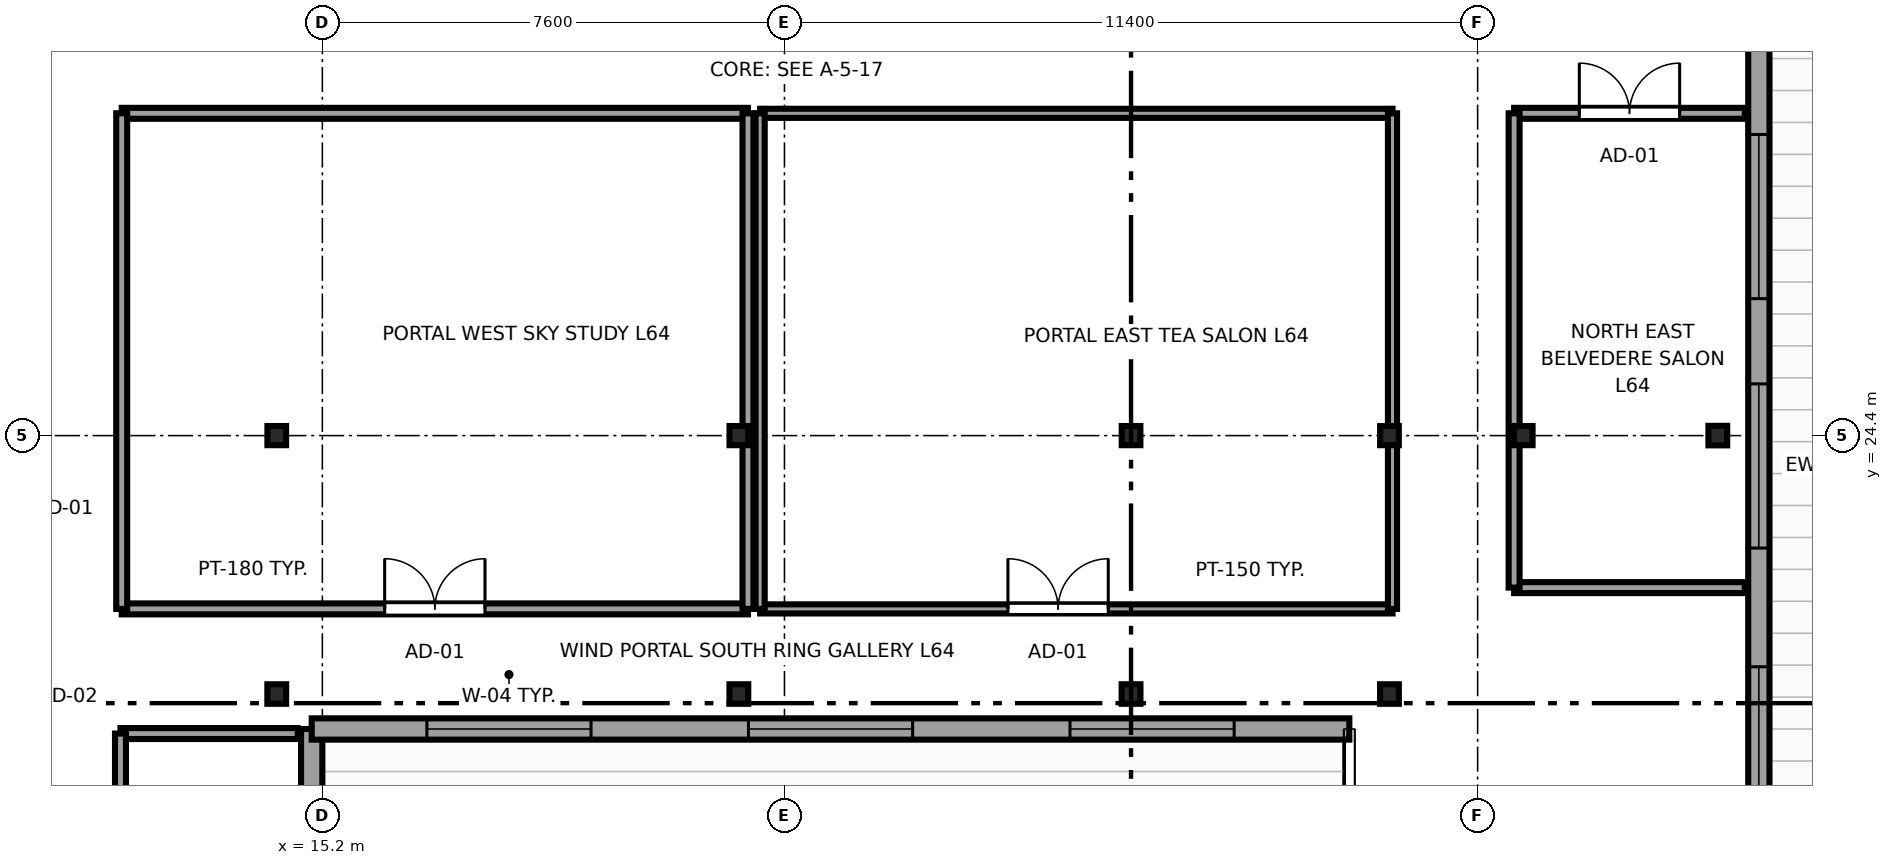
"""IFC4 building model, lengths in metres.
Left out: names, types, materials, properties, quantities, classifications, styles, units other than length and angle.
Written with IfcOpenShell. Run it as: python <this file> out.ifc"""

import sys

from ifc_helpers import new_model, si_unit, direction, frame, frame_2d, origin, origin_2d, place, context, subcontext, project, spatial, rectangle, i_section, extrude, source, transform, mapped, element, fill, save


model = new_model("IFC4")
c1 = context("Model", 3, precision=1e-05, world=origin(), true_north=direction((0.0, 1.0)))
c2 = subcontext(c1, "Body", "Model", "MODEL_VIEW")
j1 = project(units=[si_unit("LENGTHUNIT", "METRE"), si_unit("PLANEANGLEUNIT", "RADIAN")], contexts=[c1])
p1 = place(None, origin())
s1 = spatial("IfcSite", under=j1, at=p1, CompositionType="ELEMENT")
p2 = place(p1, origin())
s2 = spatial("IfcBuilding", under=s1, at=p2, CompositionType="ELEMENT")
p3 = place(p2, frame((0.0, 0.0, 241.65)))
s3 = spatial("IfcBuildingStorey", under=s2, at=p3, CompositionType="ELEMENT", Elevation=241.65)
m1 = source(origin(), c2, "Body", "SweptSolid", [
    extrude(i_section(OverallWidth=0.307, OverallDepth=0.315, WebThickness=0.012, FlangeThickness=0.019, FilletRadius=0.017, at=origin_2d()), origin(), (0.0, 0.0, 1.0), 3.55),
])
for number, where, z_axis, x_axis in (
    (1, (14.45, 24.4, 0.0), (0.0, 0.0, 1.0), (1.0, 0.0, 0.0)),
    (2, (22.05, 24.4, 0.0), (0.0, 0.0, 1.0), (1.0, 0.0, 0.0)),
    (3, (28.5, 24.4, 0.0), (0.0, 0.0, 1.0), (1.0, 0.0, 0.0)),
    (4, (32.75, 24.4, 0.0), (0.0, 0.0, 1.0), (1.0, 0.0, 0.0)),
    (5, (34.95, 24.4, 0.0), (0.0, 0.0, 1.0), (1.0, 0.0, 0.0)),
):
    element("IfcColumn", number, at=place(p3, frame(where, z_axis=z_axis, x_axis=x_axis)), inside=s3, PredefinedType="COLUMN", context=c2, shape_type="MappedRepresentation", body=[
        mapped(m1, transform((0.0, 0.0, 0.0), x_axis=(1.0, 0.0, 0.0), y_axis=(0.0, 1.0, 0.0), z_axis=(0.0, 0.0, 1.0), scale=1.0)),
    ])
m2 = source(origin(), c2, "Body", "SweptSolid", [
    extrude(i_section(OverallWidth=0.309, OverallDepth=0.321, WebThickness=0.014, FlangeThickness=0.022, FilletRadius=0.017, at=origin_2d()), origin(), (0.0, 0.0, 1.0), 3.55),
])
for number, where, z_axis, x_axis in (
    (6, (38.15, 24.4, 0.0), (0.0, 0.0, 1.0), (1.0, 0.0, 0.0)),
    (7, (14.45, 20.15, 0.0), (0.0, 0.0, 1.0), (1.0, 0.0, 0.0)),
    (8, (22.05, 20.15, 0.0), (0.0, 0.0, 1.0), (1.0, 0.0, 0.0)),
    (9, (28.5, 20.15, 0.0), (0.0, 0.0, 1.0), (1.0, 0.0, 0.0)),
    (10, (32.75, 20.15, 0.0), (0.0, 0.0, 1.0), (1.0, 0.0, 0.0)),
):
    element("IfcColumn", number, at=place(p3, frame(where, z_axis=z_axis, x_axis=x_axis)), inside=s3, PredefinedType="COLUMN", context=c2, shape_type="MappedRepresentation", body=[
        mapped(m2, transform((0.0, 0.0, 0.0), x_axis=(1.0, 0.0, 0.0), y_axis=(0.0, 1.0, 0.0), z_axis=(0.0, 0.0, 1.0), scale=1.0)),
    ])
p4 = place(p3, frame((15.025, 2.775, 0.0), z_axis=(0.0, 0.0, 1.0), x_axis=(0.0, 1.0, 0.0)))
e11 = element("IfcWall", 11, at=p4, inside=s3, PredefinedType="SOLIDWALL", context=c2, shape_type="SweptSolid", body=[
    extrude(rectangle(XDim=16.8, YDim=0.35, at=frame_2d((8.4, 0.0))), origin(), (0.0, 0.0, 1.0), 3.37),
])
p5 = place(p4, frame((10.225, 0.0, 0.0), z_axis=(0.0, 0.0, 1.0), x_axis=(-1.0, 0.0, 0.0)))
e12 = element("IfcOpeningElement", 12, at=p5, cuts=e11, PredefinedType="OPENING", context=c2, shape_type="SweptSolid", body=[
    extrude(rectangle(XDim=1.8, YDim=2.15, at=frame_2d((0.9, 1.075))), frame((0.0, 0.185, 0.0), z_axis=(0.0, -1.0, 0.0), x_axis=(1.0, 0.0, 0.0)), (0.0, 0.0, 1.0), 0.37),
])
p6 = place(p4, frame((1.85, 0.0, 0.68)))
e13 = element("IfcOpeningElement", 13, at=p6, cuts=e11, PredefinedType="OPENING", context=c2, shape_type="SweptSolid", body=[
    extrude(rectangle(XDim=2.7, YDim=1.95, at=frame_2d((1.35, 0.975))), frame((0.0, 0.185, 0.0), z_axis=(0.0, -1.0, 0.0), x_axis=(1.0, 0.0, 0.0)), (0.0, 0.0, 1.0), 0.37),
])
p7 = place(p4, frame((12.25, 0.0, 0.68)))
e14 = element("IfcOpeningElement", 14, at=p7, cuts=e11, PredefinedType="OPENING", context=c2, shape_type="SweptSolid", body=[
    extrude(rectangle(XDim=2.7, YDim=1.95, at=frame_2d((1.35, 0.975))), frame((0.0, 0.185, 0.0), z_axis=(0.0, -1.0, 0.0), x_axis=(1.0, 0.0, 0.0)), (0.0, 0.0, 1.0), 0.37),
])
p8 = place(p3, frame((15.025, 19.575, 0.0), z_axis=(0.0, 0.0, 1.0), x_axis=(1.0, 0.0, 0.0)))
e15 = element("IfcWall", 15, at=p8, inside=s3, PredefinedType="SOLIDWALL", context=c2, shape_type="SweptSolid", body=[
    extrude(rectangle(XDim=17.065, YDim=0.35, at=frame_2d((8.533, 0.0))), origin(), (0.0, 0.0, 1.0), 3.37),
])
p9 = place(p8, frame((1.894, 0.0, 0.68)))
e16 = element("IfcOpeningElement", 16, at=p9, cuts=e15, PredefinedType="OPENING", context=c2, shape_type="SweptSolid", body=[
    extrude(rectangle(XDim=2.7, YDim=1.95, at=frame_2d((1.35, 0.975))), frame((0.0, 0.185, 0.0), z_axis=(0.0, -1.0, 0.0), x_axis=(1.0, 0.0, 0.0)), (0.0, 0.0, 1.0), 0.37),
])
p10 = place(p8, frame((7.183, 0.0, 0.68)))
e17 = element("IfcOpeningElement", 17, at=p10, cuts=e15, PredefinedType="OPENING", context=c2, shape_type="SweptSolid", body=[
    extrude(rectangle(XDim=2.7, YDim=1.95, at=frame_2d((1.35, 0.975))), frame((0.0, 0.185, 0.0), z_axis=(0.0, -1.0, 0.0), x_axis=(1.0, 0.0, 0.0)), (0.0, 0.0, 1.0), 0.37),
])
p11 = place(p8, frame((12.471, 0.0, 0.68)))
e18 = element("IfcOpeningElement", 18, at=p11, cuts=e15, PredefinedType="OPENING", context=c2, shape_type="SweptSolid", body=[
    extrude(rectangle(XDim=2.7, YDim=1.95, at=frame_2d((1.35, 0.975))), frame((0.0, 0.185, 0.0), z_axis=(0.0, -1.0, 0.0), x_axis=(1.0, 0.0, 0.0)), (0.0, 0.0, 1.0), 0.37),
])
p12 = place(p3, frame((38.825, 7.017, 0.0), z_axis=(0.0, 0.0, 1.0), x_axis=(0.0, 1.0, 0.0)))
e19 = element("IfcWall", 19, at=p12, inside=s3, PredefinedType="SOLIDWALL", context=c2, shape_type="SweptSolid", body=[
    extrude(rectangle(XDim=33.766, YDim=0.35, at=frame_2d((16.883, 0.0))), origin(), (0.0, 0.0, 1.0), 3.37),
])
p13 = place(p12, frame((1.576, 0.0, 0.68)))
e20 = element("IfcOpeningElement", 20, at=p13, cuts=e19, PredefinedType="OPENING", context=c2, shape_type="SweptSolid", body=[
    extrude(rectangle(XDim=2.7, YDim=1.95, at=frame_2d((1.35, 0.975))), frame((0.0, 0.185, 0.0), z_axis=(0.0, -1.0, 0.0), x_axis=(1.0, 0.0, 0.0)), (0.0, 0.0, 1.0), 0.37),
])
p14 = place(p12, frame((6.228, 0.0, 0.68)))
e21 = element("IfcOpeningElement", 21, at=p14, cuts=e19, PredefinedType="OPENING", context=c2, shape_type="SweptSolid", body=[
    extrude(rectangle(XDim=2.7, YDim=1.95, at=frame_2d((1.35, 0.975))), frame((0.0, 0.185, 0.0), z_axis=(0.0, -1.0, 0.0), x_axis=(1.0, 0.0, 0.0)), (0.0, 0.0, 1.0), 0.37),
])
p15 = place(p12, frame((10.881, 0.0, 0.68)))
e22 = element("IfcOpeningElement", 22, at=p15, cuts=e19, PredefinedType="OPENING", context=c2, shape_type="SweptSolid", body=[
    extrude(rectangle(XDim=2.7, YDim=1.95, at=frame_2d((1.35, 0.975))), frame((0.0, 0.185, 0.0), z_axis=(0.0, -1.0, 0.0), x_axis=(1.0, 0.0, 0.0)), (0.0, 0.0, 1.0), 0.37),
])
p16 = place(p12, frame((15.533, 0.0, 0.68)))
e23 = element("IfcOpeningElement", 23, at=p16, cuts=e19, PredefinedType="OPENING", context=c2, shape_type="SweptSolid", body=[
    extrude(rectangle(XDim=2.7, YDim=1.95, at=frame_2d((1.35, 0.975))), frame((0.0, 0.185, 0.0), z_axis=(0.0, -1.0, 0.0), x_axis=(1.0, 0.0, 0.0)), (0.0, 0.0, 1.0), 0.37),
])
p17 = place(p12, frame((19.635, 0.0, 0.68)))
e24 = element("IfcOpeningElement", 24, at=p17, cuts=e19, PredefinedType="OPENING", context=c2, shape_type="SweptSolid", body=[
    extrude(rectangle(XDim=2.7, YDim=1.95, at=frame_2d((1.35, 0.975))), frame((0.0, 0.185, 0.0), z_axis=(0.0, -1.0, 0.0), x_axis=(1.0, 0.0, 0.0)), (0.0, 0.0, 1.0), 0.37),
])
p18 = place(p12, frame((25.387, 0.0, 0.68)))
e25 = element("IfcOpeningElement", 25, at=p18, cuts=e19, PredefinedType="OPENING", context=c2, shape_type="SweptSolid", body=[
    extrude(rectangle(XDim=2.7, YDim=1.95, at=frame_2d((1.35, 0.975))), frame((0.0, 0.185, 0.0), z_axis=(0.0, -1.0, 0.0), x_axis=(1.0, 0.0, 0.0)), (0.0, 0.0, 1.0), 0.37),
])
p19 = place(p12, frame((29.489, 0.0, 0.68)))
e26 = element("IfcOpeningElement", 26, at=p19, cuts=e19, PredefinedType="OPENING", context=c2, shape_type="SweptSolid", body=[
    extrude(rectangle(XDim=2.7, YDim=1.95, at=frame_2d((1.35, 0.975))), frame((0.0, 0.185, 0.0), z_axis=(0.0, -1.0, 0.0), x_axis=(1.0, 0.0, 0.0)), (0.0, 0.0, 1.0), 0.37),
])
p20 = place(p3, frame((11.88, 19.5, 0.0), z_axis=(0.0, 0.0, 1.0), x_axis=(1.0, 0.0, 0.0)))
e27 = element("IfcWall", 27, at=p20, inside=s3, PredefinedType="PARTITIONING", context=c2, shape_type="SweptSolid", body=[
    extrude(rectangle(XDim=2.915, YDim=0.18, at=frame_2d((1.458, 0.0))), origin(), (0.0, 0.0, 1.0), 3.37),
])
p21 = place(p3, frame((11.88, 10.2, 0.0), z_axis=(0.0, 0.0, 1.0), x_axis=(0.0, 1.0, 0.0)))
e28 = element("IfcWall", 28, at=p21, inside=s3, PredefinedType="PARTITIONING", context=c2, shape_type="SweptSolid", body=[
    extrude(rectangle(XDim=9.3, YDim=0.18, at=frame_2d((4.65, 0.0))), origin(), (0.0, 0.0, 1.0), 3.37),
])
p22 = place(p21, frame((3.525, 0.0, 0.0)))
e29 = element("IfcOpeningElement", 29, at=p22, cuts=e28, PredefinedType="OPENING", context=c2, shape_type="SweptSolid", body=[
    extrude(rectangle(XDim=1.65, YDim=2.15, at=frame_2d((0.825, 1.075))), frame((0.0, 0.1, 0.0), z_axis=(0.0, -1.0, 0.0), x_axis=(1.0, 0.0, 0.0)), (0.0, 0.0, 1.0), 0.2),
])
p23 = place(p3, frame((11.9, 21.55, 0.0), z_axis=(0.0, 0.0, 1.0), x_axis=(1.0, 0.0, 0.0)))
e30 = element("IfcWall", 30, at=p23, inside=s3, PredefinedType="PARTITIONING", context=c2, shape_type="SweptSolid", body=[
    extrude(rectangle(XDim=10.3, YDim=0.18, at=frame_2d((5.15, 0.0))), origin(), (0.0, 0.0, 1.0), 3.37),
])
p24 = place(p23, frame((4.325, 0.0, 0.0)))
e31 = element("IfcOpeningElement", 31, at=p24, cuts=e30, PredefinedType="OPENING", context=c2, shape_type="SweptSolid", body=[
    extrude(rectangle(XDim=1.65, YDim=2.15, at=frame_2d((0.825, 1.075))), frame((0.0, 0.1, 0.0), z_axis=(0.0, -1.0, 0.0), x_axis=(1.0, 0.0, 0.0)), (0.0, 0.0, 1.0), 0.2),
])
p25 = place(p3, frame((11.9, 29.7, 0.0), z_axis=(0.0, 0.0, 1.0), x_axis=(1.0, 0.0, 0.0)))
e32 = element("IfcWall", 32, at=p25, inside=s3, PredefinedType="PARTITIONING", context=c2, shape_type="SweptSolid", body=[
    extrude(rectangle(XDim=10.3, YDim=0.18, at=frame_2d((5.15, 0.0))), origin(), (0.0, 0.0, 1.0), 3.37),
])
p26 = place(p3, frame((11.9, 21.55, 0.0), z_axis=(0.0, 0.0, 1.0), x_axis=(0.0, 1.0, 0.0)))
e33 = element("IfcWall", 33, at=p26, inside=s3, PredefinedType="PARTITIONING", context=c2, shape_type="SweptSolid", body=[
    extrude(rectangle(XDim=8.15, YDim=0.18, at=frame_2d((4.075, 0.0))), origin(), (0.0, 0.0, 1.0), 3.37),
])
p27 = place(p3, frame((22.2, 21.55, 0.0), z_axis=(0.0, 0.0, 1.0), x_axis=(0.0, 1.0, 0.0)))
e34 = element("IfcWall", 34, at=p27, inside=s3, PredefinedType="PARTITIONING", context=c2, shape_type="SweptSolid", body=[
    extrude(rectangle(XDim=8.15, YDim=0.18, at=frame_2d((4.075, 0.0))), origin(), (0.0, 0.0, 1.0), 2.16),
])
p28 = place(p3, frame((22.4, 21.55, 0.0), z_axis=(0.0, 0.0, 1.0), x_axis=(1.0, 0.0, 0.0)))
e35 = element("IfcWall", 35, at=p28, inside=s3, PredefinedType="PARTITIONING", context=c2, shape_type="SweptSolid", body=[
    extrude(rectangle(XDim=10.4, YDim=0.15, at=frame_2d((5.2, 0.0))), origin(), (0.0, 0.0, 1.0), 3.37),
])
p29 = place(p28, frame((4.075, 0.0, 0.0)))
e36 = element("IfcOpeningElement", 36, at=p29, cuts=e35, PredefinedType="OPENING", context=c2, shape_type="SweptSolid", body=[
    extrude(rectangle(XDim=1.65, YDim=2.15, at=frame_2d((0.825, 1.075))), frame((0.0, 0.085, 0.0), z_axis=(0.0, -1.0, 0.0), x_axis=(1.0, 0.0, 0.0)), (0.0, 0.0, 1.0), 0.17),
])
p30 = place(p3, frame((22.4, 29.7, 0.0), z_axis=(0.0, 0.0, 1.0), x_axis=(1.0, 0.0, 0.0)))
e37 = element("IfcWall", 37, at=p30, inside=s3, PredefinedType="PARTITIONING", context=c2, shape_type="SweptSolid", body=[
    extrude(rectangle(XDim=10.4, YDim=0.15, at=frame_2d((5.2, 0.0))), origin(), (0.0, 0.0, 1.0), 3.37),
])
p31 = place(p3, frame((22.4, 21.55, 0.0), z_axis=(0.0, 0.0, 1.0), x_axis=(0.0, 1.0, 0.0)))
e38 = element("IfcWall", 38, at=p31, inside=s3, PredefinedType="PARTITIONING", context=c2, shape_type="SweptSolid", body=[
    extrude(rectangle(XDim=8.15, YDim=0.15, at=frame_2d((4.075, 0.0))), origin(), (0.0, 0.0, 1.0), 3.37),
])
p32 = place(p3, frame((32.8, 21.55, 0.0), z_axis=(0.0, 0.0, 1.0), x_axis=(0.0, 1.0, 0.0)))
e39 = element("IfcWall", 39, at=p32, inside=s3, PredefinedType="PARTITIONING", context=c2, shape_type="SweptSolid", body=[
    extrude(rectangle(XDim=8.15, YDim=0.15, at=frame_2d((4.075, 0.0))), origin(), (0.0, 0.0, 1.0), 2.16),
])
p33 = place(p3, frame((34.8, 21.9, 0.0), z_axis=(0.0, 0.0, 1.0), x_axis=(1.0, 0.0, 0.0)))
e40 = element("IfcWall", 40, at=p33, inside=s3, PredefinedType="PARTITIONING", context=c2, shape_type="SweptSolid", body=[
    extrude(rectangle(XDim=3.795, YDim=0.18, at=frame_2d((1.897, 0.0))), origin(), (0.0, 0.0, 1.0), 3.37),
])
p34 = place(p3, frame((34.8, 29.7, 0.0), z_axis=(0.0, 0.0, 1.0), x_axis=(1.0, 0.0, 0.0)))
e41 = element("IfcWall", 41, at=p34, inside=s3, PredefinedType="PARTITIONING", context=c2, shape_type="SweptSolid", body=[
    extrude(rectangle(XDim=3.795, YDim=0.18, at=frame_2d((1.897, 0.0))), origin(), (0.0, 0.0, 1.0), 3.37),
])
p35 = place(p34, frame((1.073, 0.0, 0.0)))
e42 = element("IfcOpeningElement", 42, at=p35, cuts=e41, PredefinedType="OPENING", context=c2, shape_type="SweptSolid", body=[
    extrude(rectangle(XDim=1.65, YDim=2.15, at=frame_2d((0.825, 1.075))), frame((0.0, 0.1, 0.0), z_axis=(0.0, -1.0, 0.0), x_axis=(1.0, 0.0, 0.0)), (0.0, 0.0, 1.0), 0.2),
])
p36 = place(p3, frame((34.8, 21.9, 0.0), z_axis=(0.0, 0.0, 1.0), x_axis=(0.0, 1.0, 0.0)))
e43 = element("IfcWall", 43, at=p36, inside=s3, PredefinedType="PARTITIONING", context=c2, shape_type="SweptSolid", body=[
    extrude(rectangle(XDim=7.8, YDim=0.18, at=frame_2d((3.9, 0.0))), origin(), (0.0, 0.0, 1.0), 2.16),
])
m3 = source(origin(), c2, "Body", "SweptSolid", [
    extrude(rectangle(XDim=2.7, YDim=1.95, at=frame_2d((1.35, 0.975))), frame((0.0, 0.09, 0.0), z_axis=(0.0, -1.0, 0.0), x_axis=(1.0, 0.0, 0.0)), (0.0, 0.0, 1.0), 0.06),
])
p37 = place(p9, origin())
e44 = element("IfcWindow", 44, at=p37, inside=s3, PartitioningType="TRIPLE_PANEL_HORIZONTAL", PredefinedType="WINDOW", context=c2, shape_type="MappedRepresentation", body=[
    mapped(m3, transform((0.0, 0.0, 0.0), x_axis=(1.0, 0.0, 0.0), y_axis=(0.0, 1.0, 0.0), z_axis=(0.0, 0.0, 1.0), scale=1.0)),
])
fill(e16, e44)
p38 = place(p10, origin())
e45 = element("IfcWindow", 45, at=p38, inside=s3, PartitioningType="TRIPLE_PANEL_HORIZONTAL", PredefinedType="WINDOW", context=c2, shape_type="MappedRepresentation", body=[
    mapped(m3, transform((0.0, 0.0, 0.0), x_axis=(1.0, 0.0, 0.0), y_axis=(0.0, 1.0, 0.0), z_axis=(0.0, 0.0, 1.0), scale=1.0)),
])
fill(e17, e45)
p39 = place(p11, origin())
e46 = element("IfcWindow", 46, at=p39, inside=s3, PartitioningType="TRIPLE_PANEL_HORIZONTAL", PredefinedType="WINDOW", context=c2, shape_type="MappedRepresentation", body=[
    mapped(m3, transform((0.0, 0.0, 0.0), x_axis=(1.0, 0.0, 0.0), y_axis=(0.0, 1.0, 0.0), z_axis=(0.0, 0.0, 1.0), scale=1.0)),
])
fill(e18, e46)
p40 = place(p15, origin())
e47 = element("IfcWindow", 47, at=p40, inside=s3, PartitioningType="TRIPLE_PANEL_HORIZONTAL", PredefinedType="WINDOW", context=c2, shape_type="MappedRepresentation", body=[
    mapped(m3, transform((0.0, 0.0, 0.0), x_axis=(1.0, 0.0, 0.0), y_axis=(0.0, 1.0, 0.0), z_axis=(0.0, 0.0, 1.0), scale=1.0)),
])
fill(e22, e47)
p41 = place(p16, origin())
e48 = element("IfcWindow", 48, at=p41, inside=s3, PartitioningType="TRIPLE_PANEL_HORIZONTAL", PredefinedType="WINDOW", context=c2, shape_type="MappedRepresentation", body=[
    mapped(m3, transform((0.0, 0.0, 0.0), x_axis=(1.0, 0.0, 0.0), y_axis=(0.0, 1.0, 0.0), z_axis=(0.0, 0.0, 1.0), scale=1.0)),
])
fill(e23, e48)
p42 = place(p17, origin())
e49 = element("IfcWindow", 49, at=p42, inside=s3, PartitioningType="TRIPLE_PANEL_HORIZONTAL", PredefinedType="WINDOW", context=c2, shape_type="MappedRepresentation", body=[
    mapped(m3, transform((0.0, 0.0, 0.0), x_axis=(1.0, 0.0, 0.0), y_axis=(0.0, 1.0, 0.0), z_axis=(0.0, 0.0, 1.0), scale=1.0)),
])
fill(e24, e49)
m4 = source(origin(), c2, "Body", "SweptSolid", [
    extrude(rectangle(XDim=1.65, YDim=2.15, at=frame_2d((0.825, 1.075))), frame((0.0, 0.025, 0.0), z_axis=(0.0, -1.0, 0.0), x_axis=(1.0, 0.0, 0.0)), (0.0, 0.0, 1.0), 0.05),
])
p43 = place(p24, origin())
e50 = element("IfcDoor", 50, at=p43, inside=s3, OperationType="DOUBLE_DOOR_SINGLE_SWING", PredefinedType="DOOR", context=c2, shape_type="MappedRepresentation", body=[
    mapped(m4, transform((0.0, 0.0, 0.0), x_axis=(1.0, 0.0, 0.0), y_axis=(0.0, 1.0, 0.0), z_axis=(0.0, 0.0, 1.0), scale=1.0)),
])
fill(e31, e50)
p44 = place(p29, origin())
e51 = element("IfcDoor", 51, at=p44, inside=s3, OperationType="DOUBLE_DOOR_SINGLE_SWING", PredefinedType="DOOR", context=c2, shape_type="MappedRepresentation", body=[
    mapped(m4, transform((0.0, 0.0, 0.0), x_axis=(1.0, 0.0, 0.0), y_axis=(0.0, 1.0, 0.0), z_axis=(0.0, 0.0, 1.0), scale=1.0)),
])
fill(e36, e51)
p45 = place(p35, origin())
e52 = element("IfcDoor", 52, at=p45, inside=s3, OperationType="DOUBLE_DOOR_SINGLE_SWING", PredefinedType="DOOR", context=c2, shape_type="MappedRepresentation", body=[
    mapped(m4, transform((0.0, 0.0, 0.0), x_axis=(1.0, 0.0, 0.0), y_axis=(0.0, 1.0, 0.0), z_axis=(0.0, 0.0, 1.0), scale=1.0)),
])
fill(e42, e52)
save(model, sys.argv[1])
